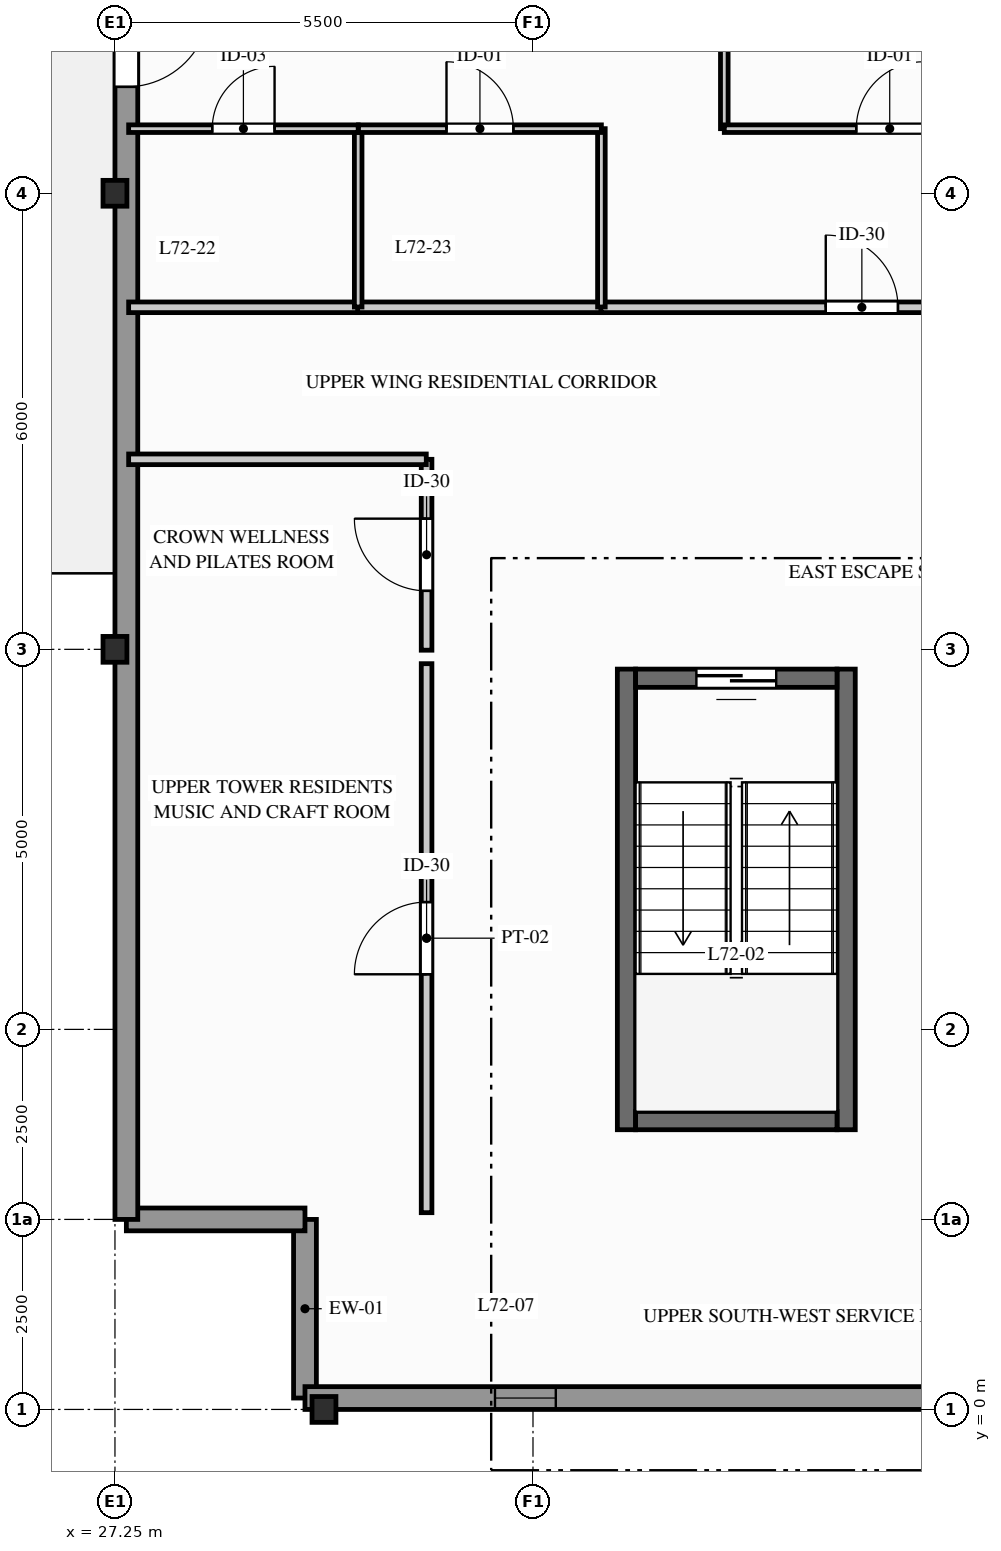
"""IFC4 building model, lengths in metres.
Left out: names, types, materials, properties, quantities, classifications, styles, units other than length and angle.
Written with IfcOpenShell. Run it as: python <this file> out.ifc"""

import sys

from ifc_helpers import new_model, si_unit, direction, frame, frame_2d, origin, origin_2d, place, context, subcontext, project, spatial, rectangle, i_section, extrude, element, fill, save


model = new_model("IFC4")
c1 = context("Model", 3, precision=1e-05, world=origin(), true_north=direction((0.0, 1.0)))
c2 = subcontext(c1, "Body", "Model", "MODEL_VIEW")
j1 = project(units=[si_unit("LENGTHUNIT", "METRE"), si_unit("PLANEANGLEUNIT", "RADIAN")], contexts=[c1])
p1 = place(None, origin())
s1 = spatial("IfcSite", under=j1, at=p1, CompositionType="ELEMENT")
p2 = place(p1, origin())
s2 = spatial("IfcBuilding", under=s1, at=p2, CompositionType="ELEMENT")
p3 = place(p2, frame((0.0, 0.0, 236.6)))
s3 = spatial("IfcBuildingStorey", under=s2, at=p3, CompositionType="ELEMENT", Elevation=236.6)
for number, where, z_axis, x_axis in (
    (1, (27.25, 10.0, 0.0), (0.0, 0.0, 1.0), (1.0, 0.0, 0.0)),
    (2, (27.25, 16.0, 0.0), (0.0, 0.0, 1.0), (1.0, 0.0, 0.0)),
    (3, (30.0, 0.0, 0.0), (0.0, 0.0, 1.0), (1.0, 0.0, 0.0)),
):
    element("IfcColumn", number, at=place(p3, frame(where, z_axis=z_axis, x_axis=x_axis)), inside=s3, PredefinedType="COLUMN", context=c2, shape_type="SweptSolid", body=[
        extrude(i_section(OverallWidth=0.314, OverallDepth=0.34, WebThickness=0.019, FlangeThickness=0.031, FilletRadius=0.015, at=origin_2d()), origin(), (0.0, 0.0, 1.0), 3.45),
    ])
for number, where, z_axis, x_axis in (
    (4, (29.75, 2.5, 0.0), (0.0, 0.0, 1.0), (0.0, -1.0, 0.0)),
    (5, (27.4, 2.5, 0.0), (0.0, 0.0, 1.0), (1.0, 0.0, 0.0)),
):
    element("IfcWall", number, at=place(p3, frame(where, z_axis=z_axis, x_axis=x_axis)), inside=s3, PredefinedType="STANDARD", context=c2, shape_type="SweptSolid", body=[
        extrude(rectangle(XDim=2.35, YDim=0.3, at=frame_2d((1.175, 0.0))), origin(), (0.0, 0.0, 1.0), 3.2),
    ])
p4 = place(p3, frame((29.75, 0.15, 0.0), z_axis=(0.0, 0.0, 1.0), x_axis=(1.0, 0.0, 0.0)))
e6 = element("IfcWall", 6, at=p4, inside=s3, PredefinedType="STANDARD", context=c2, shape_type="SweptSolid", body=[
    extrude(rectangle(XDim=27.75, YDim=0.3, at=frame_2d((13.875, 0.0))), origin(), (0.0, 0.0, 1.0), 2.635),
])
p5 = place(p4, frame((2.5, 0.0, 1.016)))
e7 = element("IfcOpeningElement", 7, at=p5, cuts=e6, PredefinedType="OPENING", context=c2, shape_type="SweptSolid", body=[
    extrude(rectangle(XDim=0.8, YDim=1.4, at=frame_2d((0.4, 0.7))), frame((0.0, 0.16, 0.0), z_axis=(0.0, -1.0, 0.0), x_axis=(1.0, 0.0, 0.0)), (0.0, 0.0, 1.0), 0.32),
])
p6 = place(p4, frame((19.95, 0.0, 0.616)))
e8 = element("IfcOpeningElement", 8, at=p6, cuts=e6, PredefinedType="OPENING", context=c2, shape_type="SweptSolid", body=[
    extrude(rectangle(XDim=1.5, YDim=1.8, at=frame_2d((0.75, 0.9))), frame((0.0, 0.16, 0.0), z_axis=(0.0, -1.0, 0.0), x_axis=(1.0, 0.0, 0.0)), (0.0, 0.0, 1.0), 0.32),
])
p7 = place(p3, frame((27.4, 24.0, 0.0), z_axis=(0.0, 0.0, 1.0), x_axis=(0.0, -1.0, 0.0)))
e9 = element("IfcWall", 9, at=p7, inside=s3, PredefinedType="STANDARD", context=c2, shape_type="SweptSolid", body=[
    extrude(rectangle(XDim=21.5, YDim=0.3, at=frame_2d((10.75, 0.0))), origin(), (0.0, 0.0, 1.0), 2.635),
])
p8 = place(p7, frame((5.5, 0.0, 0.0)))
e10 = element("IfcOpeningElement", 10, at=p8, cuts=e9, PredefinedType="OPENING", context=c2, shape_type="SweptSolid", body=[
    extrude(rectangle(XDim=1.1, YDim=2.2, at=frame_2d((0.55, 1.1))), frame((0.0, 0.16, 0.0), z_axis=(0.0, -1.0, 0.0), x_axis=(1.0, 0.0, 0.0)), (0.0, 0.0, 1.0), 0.32),
])
p9 = place(p7, frame((2.43, 0.0, 0.616)))
e11 = element("IfcOpeningElement", 11, at=p9, cuts=e9, PredefinedType="OPENING", context=c2, shape_type="SweptSolid", body=[
    extrude(rectangle(XDim=1.5, YDim=1.8, at=frame_2d((0.75, 0.9))), frame((0.0, 0.16, 0.0), z_axis=(0.0, -1.0, 0.0), x_axis=(1.0, 0.0, 0.0)), (0.0, 0.0, 1.0), 0.32),
])
for number, where, z_axis, x_axis in (
    (12, (33.98, 3.68, 0.0), (0.0, 0.0, 1.0), (0.0, 1.0, 0.0)),
    (13, (36.87, 3.68, 0.0), (0.0, 0.0, 1.0), (0.0, 1.0, 0.0)),
):
    element("IfcWall", number, at=place(p3, frame(where, z_axis=z_axis, x_axis=x_axis)), inside=s3, PredefinedType="SHEAR", context=c2, shape_type="SweptSolid", body=[
        extrude(rectangle(XDim=6.06, YDim=0.24, at=frame_2d((3.03, 0.0))), origin(), (0.0, 0.0, 1.0), 3.2),
    ])
p10 = place(p3, frame((34.1, 3.8, 0.0), z_axis=(0.0, 0.0, 1.0), x_axis=(1.0, 0.0, 0.0)))
e14 = element("IfcWall", 14, at=p10, inside=s3, PredefinedType="SHEAR", context=c2, shape_type="SweptSolid", body=[
    extrude(rectangle(XDim=2.65, YDim=0.24, at=frame_2d((1.325, 0.0))), origin(), (0.0, 0.0, 1.0), 3.2),
])
p11 = place(p3, frame((36.75, 9.62, 0.0), z_axis=(0.0, 0.0, 1.0), x_axis=(-1.0, 0.0, 0.0)))
e15 = element("IfcWall", 15, at=p11, inside=s3, PredefinedType="SHEAR", context=c2, shape_type="SweptSolid", body=[
    extrude(rectangle(XDim=2.65, YDim=0.24, at=frame_2d((1.325, 0.0))), origin(), (0.0, 0.0, 1.0), 3.2),
])
p12 = place(p11, frame((0.8, 0.0, 0.0)))
e16 = element("IfcOpeningElement", 16, at=p12, cuts=e15, PredefinedType="OPENING", context=c2, shape_type="SweptSolid", body=[
    extrude(rectangle(XDim=1.05, YDim=2.06, at=frame_2d((0.525, 1.03))), frame((0.0, 0.13, 0.0), z_axis=(0.0, -1.0, 0.0), x_axis=(1.0, 0.0, 0.0)), (0.0, 0.0, 1.0), 0.26),
])
p13 = place(p3, frame((31.35, 2.589, 0.0), z_axis=(0.0, 0.0, 1.0), x_axis=(0.0, 1.0, 0.0)))
e17 = element("IfcWall", 17, at=p13, inside=s3, PredefinedType="PARTITIONING", context=c2, shape_type="SweptSolid", body=[
    extrude(rectangle(XDim=7.223, YDim=0.14, at=frame_2d((3.611, 0.0))), origin(), (0.0, 0.0, 1.0), 3.2),
])
p14 = place(p13, frame((3.136, 0.0, 0.0)))
e18 = element("IfcOpeningElement", 18, at=p14, cuts=e17, PredefinedType="OPENING", context=c2, shape_type="SweptSolid", body=[
    extrude(rectangle(XDim=0.95, YDim=2.05, at=frame_2d((0.475, 1.025))), frame((0.0, 0.08, 0.0), z_axis=(0.0, -1.0, 0.0), x_axis=(1.0, 0.0, 0.0)), (0.0, 0.0, 1.0), 0.16),
])
p15 = place(p3, frame((31.35, 9.989, 0.0), z_axis=(0.0, 0.0, 1.0), x_axis=(0.0, 1.0, 0.0)))
e19 = element("IfcWall", 19, at=p15, inside=s3, PredefinedType="PARTITIONING", context=c2, shape_type="SweptSolid", body=[
    extrude(rectangle(XDim=2.511, YDim=0.14, at=frame_2d((1.256, 0.0))), origin(), (0.0, 0.0, 1.0), 2.139),
])
p16 = place(p15, frame((0.781, 0.0, 0.0)))
e20 = element("IfcOpeningElement", 20, at=p16, cuts=e19, PredefinedType="OPENING", context=c2, shape_type="SweptSolid", body=[
    extrude(rectangle(XDim=0.95, YDim=2.05, at=frame_2d((0.475, 1.025))), frame((0.0, 0.08, 0.0), z_axis=(0.0, -1.0, 0.0), x_axis=(1.0, 0.0, 0.0)), (0.0, 0.0, 1.0), 0.16),
])
p17 = place(p3, frame((27.43, 12.5, 0.0), z_axis=(0.0, 0.0, 1.0), x_axis=(1.0, 0.0, 0.0)))
e21 = element("IfcWall", 21, at=p17, inside=s3, PredefinedType="PARTITIONING", context=c2, shape_type="SweptSolid", body=[
    extrude(rectangle(XDim=3.916, YDim=0.14, at=frame_2d((1.958, 0.0))), origin(), (0.0, 0.0, 1.0), 3.2),
])
p18 = place(p3, frame((27.43, 14.5, 0.0), z_axis=(0.0, 0.0, 1.0), x_axis=(1.0, 0.0, 0.0)))
e22 = element("IfcWall", 22, at=p18, inside=s3, PredefinedType="PARTITIONING", context=c2, shape_type="SweptSolid", body=[
    extrude(rectangle(XDim=3.031, YDim=0.14, at=frame_2d((1.516, 0.0))), origin(), (0.0, 0.0, 1.0), 3.2),
])
p19 = place(p3, frame((30.443, 14.5, 0.0), z_axis=(0.0, 0.0, 1.0), x_axis=(1.0, 0.0, 0.0)))
e23 = element("IfcWall", 23, at=p19, inside=s3, PredefinedType="PARTITIONING", context=c2, shape_type="SweptSolid", body=[
    extrude(rectangle(XDim=3.219, YDim=0.14, at=frame_2d((1.609, 0.0))), origin(), (0.0, 0.0, 1.0), 3.2),
])
p20 = place(p3, frame((33.643, 14.5, 0.0), z_axis=(0.0, 0.0, 1.0), x_axis=(1.0, 0.0, 0.0)))
e24 = element("IfcWall", 24, at=p20, inside=s3, PredefinedType="PARTITIONING", context=c2, shape_type="SweptSolid", body=[
    extrude(rectangle(XDim=6.869, YDim=0.14, at=frame_2d((3.434, 0.0))), origin(), (0.0, 0.0, 1.0), 2.563),
])
p21 = place(p20, frame((2.959, 0.0, 0.0)))
e25 = element("IfcOpeningElement", 25, at=p21, cuts=e24, PredefinedType="OPENING", context=c2, shape_type="SweptSolid", body=[
    extrude(rectangle(XDim=0.95, YDim=2.05, at=frame_2d((0.475, 1.025))), frame((0.0, 0.08, 0.0), z_axis=(0.0, -1.0, 0.0), x_axis=(1.0, 0.0, 0.0)), (0.0, 0.0, 1.0), 0.16),
])
p22 = place(p3, frame((30.45, 14.504, 0.0), z_axis=(0.0, 0.0, 1.0), x_axis=(0.0, 1.0, 0.0)))
e26 = element("IfcWall", 26, at=p22, inside=s3, PredefinedType="PARTITIONING", context=c2, shape_type="SweptSolid", body=[
    extrude(rectangle(XDim=2.346, YDim=0.1, at=frame_2d((1.173, 0.0))), origin(), (0.0, 0.0, 1.0), 2.139),
])
p23 = place(p3, frame((27.43, 16.85, 0.0), z_axis=(0.0, 0.0, 1.0), x_axis=(1.0, 0.0, 0.0)))
e27 = element("IfcWall", 27, at=p23, inside=s3, PredefinedType="PARTITIONING", context=c2, shape_type="SweptSolid", body=[
    extrude(rectangle(XDim=3.02, YDim=0.1, at=frame_2d((1.51, 0.0))), origin(), (0.0, 0.0, 1.0), 3.2),
])
p24 = place(p23, frame((1.1, 0.0, 0.0)))
e28 = element("IfcOpeningElement", 28, at=p24, cuts=e27, PredefinedType="OPENING", context=c2, shape_type="SweptSolid", body=[
    extrude(rectangle(XDim=0.82, YDim=2.02, at=frame_2d((0.41, 1.01))), frame((0.0, 0.06, 0.0), z_axis=(0.0, -1.0, 0.0), x_axis=(1.0, 0.0, 0.0)), (0.0, 0.0, 1.0), 0.12),
])
p25 = place(p3, frame((33.65, 14.504, 0.0), z_axis=(0.0, 0.0, 1.0), x_axis=(0.0, 1.0, 0.0)))
e29 = element("IfcWall", 29, at=p25, inside=s3, PredefinedType="PARTITIONING", context=c2, shape_type="SweptSolid", body=[
    extrude(rectangle(XDim=2.346, YDim=0.1, at=frame_2d((1.173, 0.0))), origin(), (0.0, 0.0, 1.0), 2.139),
])
p26 = place(p3, frame((30.454, 16.85, 0.0), z_axis=(0.0, 0.0, 1.0), x_axis=(1.0, 0.0, 0.0)))
e30 = element("IfcWall", 30, at=p26, inside=s3, PredefinedType="PARTITIONING", context=c2, shape_type="SweptSolid", body=[
    extrude(rectangle(XDim=3.196, YDim=0.1, at=frame_2d((1.598, 0.0))), origin(), (0.0, 0.0, 1.0), 3.2),
])
p27 = place(p26, frame((1.158, 0.0, 0.0)))
e31 = element("IfcOpeningElement", 31, at=p27, cuts=e30, PredefinedType="OPENING", context=c2, shape_type="SweptSolid", body=[
    extrude(rectangle(XDim=0.88, YDim=2.04, at=frame_2d((0.44, 1.02))), frame((0.0, 0.06, 0.0), z_axis=(0.0, -1.0, 0.0), x_axis=(1.0, 0.0, 0.0)), (0.0, 0.0, 1.0), 0.12),
])
p28 = place(p3, frame((35.267, 16.85, 0.0), z_axis=(0.0, 0.0, 1.0), x_axis=(0.0, 1.0, 0.0)))
e32 = element("IfcWall", 32, at=p28, inside=s3, PredefinedType="PARTITIONING", context=c2, shape_type="SweptSolid", body=[
    extrude(rectangle(XDim=4.896, YDim=0.1, at=frame_2d((2.448, 0.0))), origin(), (0.0, 0.0, 1.0), 2.82),
])
p29 = place(p3, frame((35.267, 16.85, 0.0), z_axis=(0.0, 0.0, 1.0), x_axis=(1.0, 0.0, 0.0)))
e33 = element("IfcWall", 33, at=p29, inside=s3, PredefinedType="PARTITIONING", context=c2, shape_type="SweptSolid", body=[
    extrude(rectangle(XDim=5.233, YDim=0.1, at=frame_2d((2.616, 0.0))), origin(), (0.0, 0.0, 1.0), 2.563),
])
p30 = place(p29, frame((1.737, 0.0, 0.0)))
e34 = element("IfcOpeningElement", 34, at=p30, cuts=e33, PredefinedType="OPENING", context=c2, shape_type="SweptSolid", body=[
    extrude(rectangle(XDim=0.88, YDim=2.04, at=frame_2d((0.44, 1.02))), frame((0.0, 0.06, 0.0), z_axis=(0.0, -1.0, 0.0), x_axis=(1.0, 0.0, 0.0)), (0.0, 0.0, 1.0), 0.12),
])
p31 = place(p5, origin())
e35 = element("IfcWindow", 35, at=p31, inside=s3, PartitioningType="SINGLE_PANEL", PredefinedType="WINDOW", context=c2, shape_type="SweptSolid", body=[
    extrude(rectangle(XDim=0.8, YDim=1.4, at=frame_2d((0.4, 0.7))), frame((0.0, 0.03, 0.0), z_axis=(0.0, -1.0, 0.0), x_axis=(1.0, 0.0, 0.0)), (0.0, 0.0, 1.0), 0.06),
])
fill(e7, e35)
p32 = place(p8, origin())
e36 = element("IfcDoor", 36, at=p32, inside=s3, OperationType="SINGLE_SWING_LEFT", PredefinedType="DOOR", context=c2, shape_type="SweptSolid", body=[
    extrude(rectangle(XDim=1.1, YDim=2.2, at=frame_2d((0.55, 1.1))), frame((0.0, 0.025, 0.0), z_axis=(0.0, -1.0, 0.0), x_axis=(1.0, 0.0, 0.0)), (0.0, 0.0, 1.0), 0.05),
])
fill(e10, e36)
p33 = place(p12, origin())
e37 = element("IfcDoor", 37, at=p33, inside=s3, OperationType="SINGLE_SWING_LEFT", PredefinedType="DOOR", context=c2, shape_type="SweptSolid", body=[
    extrude(rectangle(XDim=1.05, YDim=2.06, at=frame_2d((0.525, 1.03))), frame((0.0, 0.025, 0.0), z_axis=(0.0, -1.0, 0.0), x_axis=(1.0, 0.0, 0.0)), (0.0, 0.0, 1.0), 0.05),
])
fill(e16, e37)
p34 = place(p14, origin())
e38 = element("IfcDoor", 38, at=p34, inside=s3, OperationType="SINGLE_SWING_LEFT", PredefinedType="DOOR", context=c2, shape_type="SweptSolid", body=[
    extrude(rectangle(XDim=0.95, YDim=2.05, at=frame_2d((0.475, 1.025))), frame((0.0, 0.025, 0.0), z_axis=(0.0, -1.0, 0.0), x_axis=(1.0, 0.0, 0.0)), (0.0, 0.0, 1.0), 0.05),
])
fill(e18, e38)
p35 = place(p16, origin())
e39 = element("IfcDoor", 39, at=p35, inside=s3, OperationType="SINGLE_SWING_RIGHT", PredefinedType="DOOR", context=c2, shape_type="SweptSolid", body=[
    extrude(rectangle(XDim=0.95, YDim=2.05, at=frame_2d((0.475, 1.025))), frame((0.0, 0.025, 0.0), z_axis=(0.0, -1.0, 0.0), x_axis=(1.0, 0.0, 0.0)), (0.0, 0.0, 1.0), 0.05),
])
fill(e20, e39)
p36 = place(p21, origin())
e40 = element("IfcDoor", 40, at=p36, inside=s3, OperationType="SINGLE_SWING_LEFT", PredefinedType="DOOR", context=c2, shape_type="SweptSolid", body=[
    extrude(rectangle(XDim=0.95, YDim=2.05, at=frame_2d((0.475, 1.025))), frame((0.0, 0.025, 0.0), z_axis=(0.0, -1.0, 0.0), x_axis=(1.0, 0.0, 0.0)), (0.0, 0.0, 1.0), 0.05),
])
fill(e25, e40)
p37 = place(p24, origin())
e41 = element("IfcDoor", 41, at=p37, inside=s3, OperationType="SINGLE_SWING_RIGHT", PredefinedType="DOOR", context=c2, shape_type="SweptSolid", body=[
    extrude(rectangle(XDim=0.82, YDim=2.02, at=frame_2d((0.41, 1.01))), frame((0.0, 0.025, 0.0), z_axis=(0.0, -1.0, 0.0), x_axis=(1.0, 0.0, 0.0)), (0.0, 0.0, 1.0), 0.05),
])
fill(e28, e41)
p38 = place(p27, origin())
e42 = element("IfcDoor", 42, at=p38, inside=s3, OperationType="SINGLE_SWING_LEFT", PredefinedType="DOOR", context=c2, shape_type="SweptSolid", body=[
    extrude(rectangle(XDim=0.88, YDim=2.04, at=frame_2d((0.44, 1.02))), frame((0.0, 0.025, 0.0), z_axis=(0.0, -1.0, 0.0), x_axis=(1.0, 0.0, 0.0)), (0.0, 0.0, 1.0), 0.05),
])
fill(e31, e42)
p39 = place(p30, origin())
e43 = element("IfcDoor", 43, at=p39, inside=s3, OperationType="SINGLE_SWING_RIGHT", PredefinedType="DOOR", context=c2, shape_type="SweptSolid", body=[
    extrude(rectangle(XDim=0.88, YDim=2.04, at=frame_2d((0.44, 1.02))), frame((0.0, 0.025, 0.0), z_axis=(0.0, -1.0, 0.0), x_axis=(1.0, 0.0, 0.0)), (0.0, 0.0, 1.0), 0.05),
])
fill(e34, e43)
save(model, sys.argv[1])
